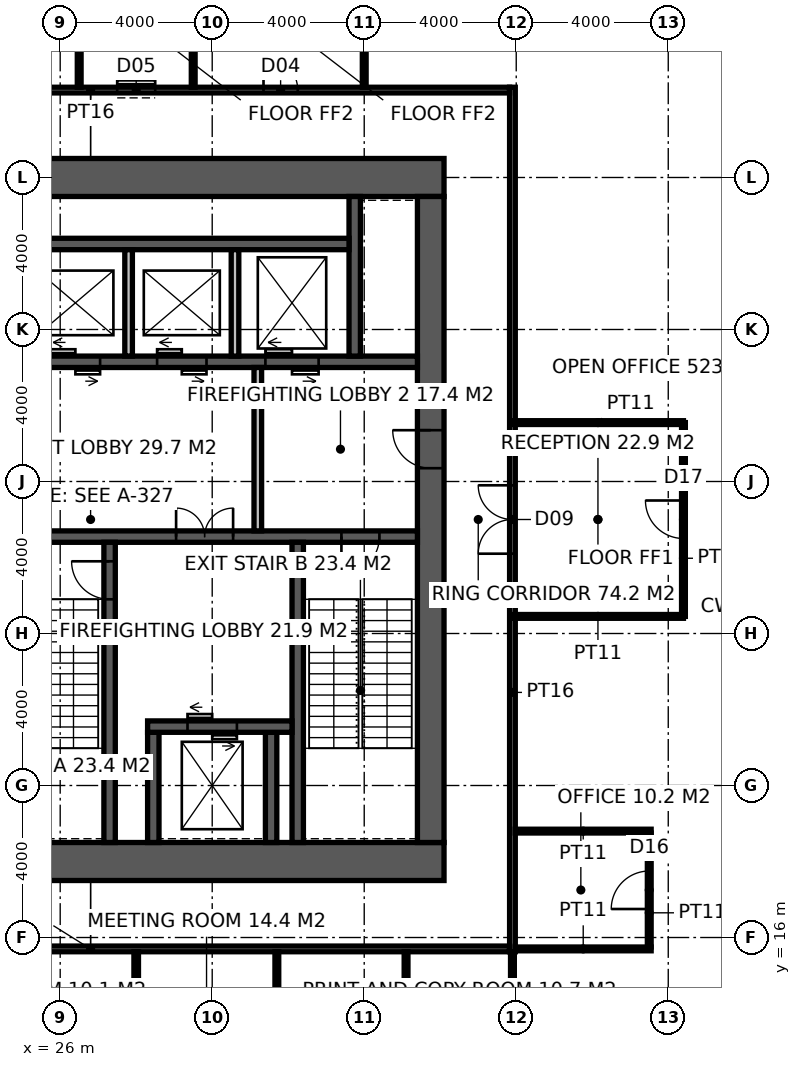
"""IFC4 building model, lengths in metres.
Left out: names, types, materials, properties, quantities, classifications, styles, units other than length and angle.
Written with IfcOpenShell. Run it as: python <this file> out.ifc"""

import sys

from ifc_helpers import new_model, si_unit, direction, frame, frame_2d, origin, place, context, subcontext, project, spatial, rectangle, extrude, element, fill, save


model = new_model("IFC4")
c1 = context("Model", 3, precision=1e-05, world=origin(), true_north=direction((0.0, 1.0)))
c2 = subcontext(c1, "Body", "Model", "MODEL_VIEW")
j1 = project(units=[si_unit("LENGTHUNIT", "METRE"), si_unit("PLANEANGLEUNIT", "RADIAN")], contexts=[c1])
p1 = place(None, origin())
s1 = spatial("IfcSite", under=j1, at=p1, CompositionType="ELEMENT")
p2 = place(p1, origin())
s2 = spatial("IfcBuilding", under=s1, at=p2, CompositionType="ELEMENT")
p3 = place(p2, frame((0.0, 0.0, 142.8)))
s3 = spatial("IfcBuildingStorey", under=s2, at=p3, CompositionType="ELEMENT", Elevation=142.8)
p4 = place(p3, frame((18.5, 18.0, -0.15), z_axis=(0.0, 0.0, 1.0), x_axis=(1.0, 0.0, 0.0)))
e1 = element("IfcWall", 1, at=p4, inside=s3, PredefinedType="SHEAR", context=c2, shape_type="SweptSolid", body=[
    extrude(rectangle(XDim=17.6, YDim=1.0, at=frame_2d((8.8, 0.0))), origin(), (0.0, 0.0, 1.0), 5.0),
])
p5 = place(p4, frame((3.45, 0.0, 0.15)))
e2 = element("IfcOpeningElement", 2, at=p5, cuts=e1, PredefinedType="OPENING", context=c2, shape_type="SweptSolid", body=[
    extrude(rectangle(XDim=1.5, YDim=2.4, at=frame_2d((0.75, 1.2))), frame((0.0, 0.51, 0.0), z_axis=(0.0, -1.0, 0.0), x_axis=(1.0, 0.0, 0.0)), (0.0, 0.0, 1.0), 1.02),
])
p6 = place(p3, frame((18.5, 36.0, -0.15), z_axis=(0.0, 0.0, 1.0), x_axis=(1.0, 0.0, 0.0)))
e3 = element("IfcWall", 3, at=p6, inside=s3, PredefinedType="SHEAR", context=c2, shape_type="SweptSolid", body=[
    extrude(rectangle(XDim=17.6, YDim=1.0, at=frame_2d((8.8, 0.0))), origin(), (0.0, 0.0, 1.0), 5.0),
])
p7 = place(p3, frame((35.75, 18.5, -0.15), z_axis=(0.0, 0.0, 1.0), x_axis=(0.0, 1.0, 0.0)))
e4 = element("IfcWall", 4, at=p7, inside=s3, PredefinedType="SHEAR", context=c2, shape_type="SweptSolid", body=[
    extrude(rectangle(XDim=17.0, YDim=0.7, at=frame_2d((8.5, 0.0))), origin(), (0.0, 0.0, 1.0), 5.0),
])
p8 = place(p7, frame((9.85, 0.0, 0.15)))
e5 = element("IfcOpeningElement", 5, at=p8, cuts=e4, PredefinedType="OPENING", context=c2, shape_type="SweptSolid", body=[
    extrude(rectangle(XDim=1.0, YDim=2.2, at=frame_2d((0.5, 1.1))), frame((0.0, 0.36, 0.0), z_axis=(0.0, -1.0, 0.0), x_axis=(1.0, 0.0, 0.0)), (0.0, 0.0, 1.0), 0.72),
])
p9 = place(p3, frame((24.15, 26.55, -0.15), z_axis=(0.0, 0.0, 1.0), x_axis=(1.0, 0.0, 0.0)))
e6 = element("IfcWall", 6, at=p9, inside=s3, PredefinedType="SHEAR", context=c2, shape_type="SweptSolid", body=[
    extrude(rectangle(XDim=11.25, YDim=0.3, at=frame_2d((5.625, 0.0))), origin(), (0.0, 0.0, 1.0), 5.0),
])
p10 = place(p9, frame((9.25, 0.0, 0.15)))
e7 = element("IfcOpeningElement", 7, at=p10, cuts=e6, PredefinedType="OPENING", context=c2, shape_type="SweptSolid", body=[
    extrude(rectangle(XDim=1.0, YDim=2.2, at=frame_2d((0.5, 1.1))), frame((0.0, 0.16, 0.0), z_axis=(0.0, -1.0, 0.0), x_axis=(1.0, 0.0, 0.0)), (0.0, 0.0, 1.0), 0.32),
])
p11 = place(p9, frame((4.9, 0.0, 0.15)))
e8 = element("IfcOpeningElement", 8, at=p11, cuts=e6, PredefinedType="OPENING", context=c2, shape_type="SweptSolid", body=[
    extrude(rectangle(XDim=1.5, YDim=2.4, at=frame_2d((0.75, 1.2))), frame((0.0, 0.16, 0.0), z_axis=(0.0, -1.0, 0.0), x_axis=(1.0, 0.0, 0.0)), (0.0, 0.0, 1.0), 0.32),
])
p12 = place(p3, frame((27.3, 18.5, -0.15), z_axis=(0.0, 0.0, 1.0), x_axis=(0.0, 1.0, 0.0)))
e9 = element("IfcWall", 9, at=p12, inside=s3, PredefinedType="SHEAR", context=c2, shape_type="SweptSolid", body=[
    extrude(rectangle(XDim=7.9, YDim=0.3, at=frame_2d((3.95, 0.0))), origin(), (0.0, 0.0, 1.0), 5.0),
])
p13 = place(p12, frame((6.4, 0.0, 0.15)))
e10 = element("IfcOpeningElement", 10, at=p13, cuts=e9, PredefinedType="OPENING", context=c2, shape_type="SweptSolid", body=[
    extrude(rectangle(XDim=1.0, YDim=2.2, at=frame_2d((0.5, 1.1))), frame((0.0, 0.16, 0.0), z_axis=(0.0, -1.0, 0.0), x_axis=(1.0, 0.0, 0.0)), (0.0, 0.0, 1.0), 0.32),
])
p14 = place(p3, frame((32.25, 18.5, -0.15), z_axis=(0.0, 0.0, 1.0), x_axis=(0.0, 1.0, 0.0)))
e11 = element("IfcWall", 11, at=p14, inside=s3, PredefinedType="SHEAR", context=c2, shape_type="SweptSolid", body=[
    extrude(rectangle(XDim=7.9, YDim=0.3, at=frame_2d((3.95, 0.0))), origin(), (0.0, 0.0, 1.0), 5.0),
])
for number, where, z_axis, x_axis in (
    (12, (28.45, 18.5, -0.15), (0.0, 0.0, 1.0), (0.0, 1.0, 0.0)),
    (13, (31.55, 18.5, -0.15), (0.0, 0.0, 1.0), (0.0, 1.0, 0.0)),
):
    element("IfcWall", number, at=place(p3, frame(where, z_axis=z_axis, x_axis=x_axis)), inside=s3, PredefinedType="SHEAR", context=c2, shape_type="SweptSolid", body=[
        extrude(rectangle(XDim=2.9, YDim=0.3, at=frame_2d((1.45, 0.0))), origin(), (0.0, 0.0, 1.0), 5.0),
    ])
p15 = place(p3, frame((28.3, 21.55, -0.15), z_axis=(0.0, 0.0, 1.0), x_axis=(1.0, 0.0, 0.0)))
e14 = element("IfcWall", 14, at=p15, inside=s3, PredefinedType="SHEAR", context=c2, shape_type="SweptSolid", body=[
    extrude(rectangle(XDim=3.8, YDim=0.3, at=frame_2d((1.9, 0.0))), origin(), (0.0, 0.0, 1.0), 5.0),
])
p16 = place(p15, frame((1.05, 0.0, 0.15)))
e15 = element("IfcOpeningElement", 15, at=p16, cuts=e14, PredefinedType="OPENING", context=c2, shape_type="SweptSolid", body=[
    extrude(rectangle(XDim=1.3, YDim=2.4, at=frame_2d((0.65, 1.2))), frame((0.0, 0.16, 0.0), z_axis=(0.0, -1.0, 0.0), x_axis=(1.0, 0.0, 0.0)), (0.0, 0.0, 1.0), 0.32),
])
p17 = place(p3, frame((24.15, 31.15, -0.15), z_axis=(0.0, 0.0, 1.0), x_axis=(1.0, 0.0, 0.0)))
e16 = element("IfcWall", 16, at=p17, inside=s3, PredefinedType="SHEAR", context=c2, shape_type="SweptSolid", body=[
    extrude(rectangle(XDim=11.25, YDim=0.3, at=frame_2d((5.625, 0.0))), origin(), (0.0, 0.0, 1.0), 5.0),
])
p18 = place(p17, frame((1.6, 0.0, 0.15)))
e17 = element("IfcOpeningElement", 17, at=p18, cuts=e16, PredefinedType="OPENING", context=c2, shape_type="SweptSolid", body=[
    extrude(rectangle(XDim=1.3, YDim=2.4, at=frame_2d((0.65, 1.2))), frame((0.0, 0.16, 0.0), z_axis=(0.0, -1.0, 0.0), x_axis=(1.0, 0.0, 0.0)), (0.0, 0.0, 1.0), 0.32),
])
p19 = place(p17, frame((4.4, 0.0, 0.15)))
e18 = element("IfcOpeningElement", 18, at=p19, cuts=e16, PredefinedType="OPENING", context=c2, shape_type="SweptSolid", body=[
    extrude(rectangle(XDim=1.3, YDim=2.4, at=frame_2d((0.65, 1.2))), frame((0.0, 0.16, 0.0), z_axis=(0.0, -1.0, 0.0), x_axis=(1.0, 0.0, 0.0)), (0.0, 0.0, 1.0), 0.32),
])
p20 = place(p17, frame((7.25, 0.0, 0.15)))
e19 = element("IfcOpeningElement", 19, at=p20, cuts=e16, PredefinedType="OPENING", context=c2, shape_type="SweptSolid", body=[
    extrude(rectangle(XDim=1.4, YDim=2.4, at=frame_2d((0.7, 1.2))), frame((0.0, 0.16, 0.0), z_axis=(0.0, -1.0, 0.0), x_axis=(1.0, 0.0, 0.0)), (0.0, 0.0, 1.0), 0.32),
])
p21 = place(p3, frame((33.75, 31.3, -0.15), z_axis=(0.0, 0.0, 1.0), x_axis=(0.0, 1.0, 0.0)))
e20 = element("IfcWall", 20, at=p21, inside=s3, PredefinedType="SHEAR", context=c2, shape_type="SweptSolid", body=[
    extrude(rectangle(XDim=4.2, YDim=0.3, at=frame_2d((2.1, 0.0))), origin(), (0.0, 0.0, 1.0), 5.0),
])
p22 = place(p3, frame((25.0, 34.25, -0.15), z_axis=(0.0, 0.0, 1.0), x_axis=(1.0, 0.0, 0.0)))
e21 = element("IfcWall", 21, at=p22, inside=s3, PredefinedType="SHEAR", context=c2, shape_type="SweptSolid", body=[
    extrude(rectangle(XDim=8.6, YDim=0.3, at=frame_2d((4.3, 0.0))), origin(), (0.0, 0.0, 1.0), 5.0),
])
for number, where, z_axis, x_axis in (
    (22, (27.8, 31.3, -0.15), (0.0, 0.0, 1.0), (0.0, 1.0, 0.0)),
    (23, (30.6, 31.3, -0.15), (0.0, 0.0, 1.0), (0.0, 1.0, 0.0)),
):
    element("IfcWall", number, at=place(p3, frame(where, z_axis=z_axis, x_axis=x_axis)), inside=s3, PredefinedType="SOLIDWALL", context=c2, shape_type="SweptSolid", body=[
        extrude(rectangle(XDim=2.8, YDim=0.2, at=frame_2d((1.4, 0.0))), origin(), (0.0, 0.0, 1.0), 5.0),
    ])
p23 = place(p3, frame((31.2, 26.7, 0.0), z_axis=(0.0, 0.0, 1.0), x_axis=(0.0, 1.0, 0.0)))
e24 = element("IfcWall", 24, at=p23, inside=s3, PredefinedType="SOLIDWALL", context=c2, shape_type="SweptSolid", body=[
    extrude(rectangle(XDim=4.3, YDim=0.2, at=frame_2d((2.15, 0.0))), origin(), (0.0, 0.0, 1.0), 4.85),
])
p24 = place(p3, frame((37.9, 15.625, 0.0), z_axis=(0.0, 0.0, 1.0), x_axis=(0.0, 1.0, 0.0)))
e25 = element("IfcWall", 25, at=p24, inside=s3, PredefinedType="PARTITIONING", context=c2, shape_type="SweptSolid", body=[
    extrude(rectangle(XDim=22.75, YDim=0.15, at=frame_2d((11.375, 0.0))), origin(), (0.0, 0.0, 1.0), 3.95),
])
p25 = place(p24, frame((10.475, 0.0, 0.0)))
e26 = element("IfcOpeningElement", 26, at=p25, cuts=e25, PredefinedType="OPENING", context=c2, shape_type="SweptSolid", body=[
    extrude(rectangle(XDim=1.8, YDim=2.4, at=frame_2d((0.9, 1.2))), frame((0.0, 0.085, 0.0), z_axis=(0.0, -1.0, 0.0), x_axis=(1.0, 0.0, 0.0)), (0.0, 0.0, 1.0), 0.17),
])
p26 = place(p3, frame((15.775, 15.7, 0.0), z_axis=(0.0, 0.0, 1.0), x_axis=(1.0, 0.0, 0.0)))
e27 = element("IfcWall", 27, at=p26, inside=s3, PredefinedType="PARTITIONING", context=c2, shape_type="SweptSolid", body=[
    extrude(rectangle(XDim=22.05, YDim=0.15, at=frame_2d((11.025, 0.0))), origin(), (0.0, 0.0, 1.0), 4.85),
])
p27 = place(p3, frame((15.775, 38.3, 0.0), z_axis=(0.0, 0.0, 1.0), x_axis=(1.0, 0.0, 0.0)))
e28 = element("IfcWall", 28, at=p27, inside=s3, PredefinedType="PARTITIONING", context=c2, shape_type="SweptSolid", body=[
    extrude(rectangle(XDim=22.05, YDim=0.15, at=frame_2d((11.025, 0.0))), origin(), (0.0, 0.0, 1.0), 4.85),
])
p28 = place(p27, frame((7.975, 0.0, 0.0)))
e29 = element("IfcOpeningElement", 29, at=p28, cuts=e28, PredefinedType="OPENING", context=c2, shape_type="SweptSolid", body=[
    extrude(rectangle(XDim=0.9, YDim=2.1, at=frame_2d((0.45, 1.05))), frame((0.0, 0.085, 0.0), z_axis=(0.0, -1.0, 0.0), x_axis=(1.0, 0.0, 0.0)), (0.0, 0.0, 1.0), 0.17),
])
p29 = place(p27, frame((11.725, 0.0, 0.0)))
e30 = element("IfcOpeningElement", 30, at=p29, cuts=e28, PredefinedType="OPENING", context=c2, shape_type="SweptSolid", body=[
    extrude(rectangle(XDim=1.0, YDim=2.1, at=frame_2d((0.5, 1.05))), frame((0.0, 0.085, 0.0), z_axis=(0.0, -1.0, 0.0), x_axis=(1.0, 0.0, 0.0)), (0.0, 0.0, 1.0), 0.17),
])
p30 = place(p27, frame((15.575, 0.0, 0.0)))
e31 = element("IfcOpeningElement", 31, at=p30, cuts=e28, PredefinedType="OPENING", context=c2, shape_type="SweptSolid", body=[
    extrude(rectangle(XDim=0.9, YDim=2.1, at=frame_2d((0.45, 1.05))), frame((0.0, 0.085, 0.0), z_axis=(0.0, -1.0, 0.0), x_axis=(1.0, 0.0, 0.0)), (0.0, 0.0, 1.0), 0.17),
])
p31 = place(p3, frame((34.0, 38.375, 0.0), z_axis=(0.0, 0.0, 1.0), x_axis=(0.0, 1.0, 0.0)))
e32 = element("IfcWall", 32, at=p31, inside=s3, PredefinedType="PARTITIONING", context=c2, shape_type="SweptSolid", body=[
    extrude(rectangle(XDim=3.675, YDim=0.1, at=frame_2d((1.837, 0.0))), origin(), (0.0, 0.0, 1.0), 3.95),
])
for number, where, z_axis, x_axis in (
    (33, (26.5, 38.375, 0.0), (0.0, 0.0, 1.0), (0.0, 1.0, 0.0)),
    (34, (29.5, 38.375, 0.0), (0.0, 0.0, 1.0), (0.0, 1.0, 0.0)),
):
    element("IfcWall", number, at=place(p3, frame(where, z_axis=z_axis, x_axis=x_axis)), inside=s3, PredefinedType="PARTITIONING", context=c2, shape_type="SweptSolid", body=[
        extrude(rectangle(XDim=3.575, YDim=0.1, at=frame_2d((1.788, 0.0))), origin(), (0.0, 0.0, 1.0), 4.85),
    ])
p32 = place(p3, frame((28.0, 4.3, 0.0), z_axis=(0.0, 0.0, 1.0), x_axis=(0.0, 1.0, 0.0)))
e35 = element("IfcWall", 35, at=p32, inside=s3, PredefinedType="PARTITIONING", context=c2, shape_type="SweptSolid", body=[
    extrude(rectangle(XDim=11.325, YDim=0.12, at=frame_2d((5.663, 0.0))), origin(), (0.0, 0.0, 1.0), 4.85),
])
for number, where, z_axis, x_axis in (
    (36, (37.975, 15.7, 0.0), (0.0, 0.0, 1.0), (1.0, 0.0, 0.0)),
    (37, (37.975, 18.8, 0.0), (0.0, 0.0, 1.0), (1.0, 0.0, 0.0)),
):
    element("IfcWall", number, at=place(p3, frame(where, z_axis=z_axis, x_axis=x_axis)), inside=s3, PredefinedType="PARTITIONING", context=c2, shape_type="SweptSolid", body=[
        extrude(rectangle(XDim=3.575, YDim=0.1, at=frame_2d((1.788, 0.0))), origin(), (0.0, 0.0, 1.0), 4.85),
    ])
for number, where, z_axis, x_axis in (
    (38, (31.701, 11.55, 0.0), (0.0, 0.0, 1.0), (0.0, 1.0, 0.0)),
    (39, (35.101, 11.55, 0.0), (0.0, 0.0, 1.0), (0.0, 1.0, 0.0)),
):
    element("IfcWall", number, at=place(p3, frame(where, z_axis=z_axis, x_axis=x_axis)), inside=s3, PredefinedType="PARTITIONING", context=c2, shape_type="SweptSolid", body=[
        extrude(rectangle(XDim=4.075, YDim=0.1, at=frame_2d((2.038, 0.0))), origin(), (0.0, 0.0, 1.0), 4.85),
    ])
p33 = place(p3, frame((37.9, 11.55, 0.0), z_axis=(0.0, 0.0, 1.0), x_axis=(0.0, 1.0, 0.0)))
e40 = element("IfcWall", 40, at=p33, inside=s3, PredefinedType="PARTITIONING", context=c2, shape_type="SweptSolid", body=[
    extrude(rectangle(XDim=4.075, YDim=0.1, at=frame_2d((2.038, 0.0))), origin(), (0.0, 0.0, 1.0), 3.95),
])
p34 = place(p3, frame((41.5, 15.75, 0.0), z_axis=(0.0, 0.0, 1.0), x_axis=(0.0, 1.0, 0.0)))
e41 = element("IfcWall", 41, at=p34, inside=s3, PredefinedType="PARTITIONING", context=c2, shape_type="SweptSolid", body=[
    extrude(rectangle(XDim=3.0, YDim=0.1, at=frame_2d((1.5, 0.0))), origin(), (0.0, 0.0, 1.0), 4.85),
])
p35 = place(p34, frame((1.0, 0.0, 0.0)))
e42 = element("IfcOpeningElement", 42, at=p35, cuts=e41, PredefinedType="OPENING", context=c2, shape_type="SweptSolid", body=[
    extrude(rectangle(XDim=1.0, YDim=2.2, at=frame_2d((0.5, 1.1))), frame((0.0, 0.06, 0.0), z_axis=(0.0, -1.0, 0.0), x_axis=(1.0, 0.0, 0.0)), (0.0, 0.0, 1.0), 0.12),
])
p36 = place(p3, frame((37.9, 24.45, 0.0), z_axis=(0.0, 0.0, 1.0), x_axis=(1.0, 0.0, 0.0)))
e43 = element("IfcWall", 43, at=p36, inside=s3, PredefinedType="PARTITIONING", context=c2, shape_type="SweptSolid", body=[
    extrude(rectangle(XDim=4.5, YDim=0.1, at=frame_2d((2.25, 0.0))), origin(), (0.0, 0.0, 1.0), 4.85),
])
p37 = place(p3, frame((42.4, 24.45, 0.0), z_axis=(0.0, 0.0, 1.0), x_axis=(0.0, 1.0, 0.0)))
e44 = element("IfcWall", 44, at=p37, inside=s3, PredefinedType="PARTITIONING", context=c2, shape_type="SweptSolid", body=[
    extrude(rectangle(XDim=5.1, YDim=0.1, at=frame_2d((2.55, 0.0))), origin(), (0.0, 0.0, 1.0), 4.85),
])
p38 = place(p37, frame((2.05, 0.0, 0.0)))
e45 = element("IfcOpeningElement", 45, at=p38, cuts=e44, PredefinedType="OPENING", context=c2, shape_type="SweptSolid", body=[
    extrude(rectangle(XDim=1.0, YDim=2.2, at=frame_2d((0.5, 1.1))), frame((0.0, 0.06, 0.0), z_axis=(0.0, -1.0, 0.0), x_axis=(1.0, 0.0, 0.0)), (0.0, 0.0, 1.0), 0.12),
])
p39 = place(p3, frame((42.4, 29.55, 0.0), z_axis=(0.0, 0.0, 1.0), x_axis=(-1.0, 0.0, 0.0)))
e46 = element("IfcWall", 46, at=p39, inside=s3, PredefinedType="PARTITIONING", context=c2, shape_type="SweptSolid", body=[
    extrude(rectangle(XDim=4.5, YDim=0.1, at=frame_2d((2.25, 0.0))), origin(), (0.0, 0.0, 1.0), 4.85),
])
p40 = place(p13, origin())
e47 = element("IfcDoor", 47, at=p40, inside=s3, OperationType="SINGLE_SWING_RIGHT", PredefinedType="DOOR", context=c2, shape_type="SweptSolid", body=[
    extrude(rectangle(XDim=1.0, YDim=2.2, at=frame_2d((0.5, 1.1))), frame((0.0, 0.025, 0.0), z_axis=(0.0, -1.0, 0.0), x_axis=(1.0, 0.0, 0.0)), (0.0, 0.0, 1.0), 0.05),
])
fill(e10, e47)
p41 = place(p10, frame((1.0, 0.0, 0.0), z_axis=(0.0, 0.0, 1.0), x_axis=(-1.0, 0.0, 0.0)))
e48 = element("IfcDoor", 48, at=p41, inside=s3, OperationType="SINGLE_SWING_RIGHT", PredefinedType="DOOR", context=c2, shape_type="SweptSolid", body=[
    extrude(rectangle(XDim=1.0, YDim=2.2, at=frame_2d((0.5, 1.1))), frame((0.0, 0.025, 0.0), z_axis=(0.0, -1.0, 0.0), x_axis=(1.0, 0.0, 0.0)), (0.0, 0.0, 1.0), 0.05),
])
fill(e7, e48)
p42 = place(p8, origin())
e49 = element("IfcDoor", 49, at=p42, inside=s3, OperationType="SINGLE_SWING_RIGHT", PredefinedType="DOOR", context=c2, shape_type="SweptSolid", body=[
    extrude(rectangle(XDim=1.0, YDim=2.2, at=frame_2d((0.5, 1.1))), frame((0.0, 0.025, 0.0), z_axis=(0.0, -1.0, 0.0), x_axis=(1.0, 0.0, 0.0)), (0.0, 0.0, 1.0), 0.05),
])
fill(e5, e49)
p43 = place(p11, origin())
e50 = element("IfcDoor", 50, at=p43, inside=s3, OperationType="DOUBLE_DOOR_DOUBLE_SWING", PredefinedType="DOOR", context=c2, shape_type="SweptSolid", body=[
    extrude(rectangle(XDim=1.5, YDim=2.4, at=frame_2d((0.75, 1.2))), frame((0.0, 0.025, 0.0), z_axis=(0.0, -1.0, 0.0), x_axis=(1.0, 0.0, 0.0)), (0.0, 0.0, 1.0), 0.05),
])
fill(e8, e50)
p44 = place(p29, origin())
e51 = element("IfcDoor", 51, at=p44, inside=s3, OperationType="SLIDING_TO_LEFT", PredefinedType="DOOR", context=c2, shape_type="SweptSolid", body=[
    extrude(rectangle(XDim=1.0, YDim=2.1, at=frame_2d((0.5, 1.05))), frame((0.0, 0.025, 0.0), z_axis=(0.0, -1.0, 0.0), x_axis=(1.0, 0.0, 0.0)), (0.0, 0.0, 1.0), 0.05),
])
fill(e30, e51)
p45 = place(p30, origin())
e52 = element("IfcDoor", 52, at=p45, inside=s3, OperationType="SINGLE_SWING_LEFT", PredefinedType="DOOR", context=c2, shape_type="SweptSolid", body=[
    extrude(rectangle(XDim=0.9, YDim=2.1, at=frame_2d((0.45, 1.05))), frame((0.0, 0.025, 0.0), z_axis=(0.0, -1.0, 0.0), x_axis=(1.0, 0.0, 0.0)), (0.0, 0.0, 1.0), 0.05),
])
fill(e31, e52)
p46 = place(p25, origin())
e53 = element("IfcDoor", 53, at=p46, inside=s3, OperationType="DOUBLE_DOOR_DOUBLE_SWING", PredefinedType="DOOR", context=c2, shape_type="SweptSolid", body=[
    extrude(rectangle(XDim=1.8, YDim=2.4, at=frame_2d((0.9, 1.2))), frame((0.0, 0.025, 0.0), z_axis=(0.0, -1.0, 0.0), x_axis=(1.0, 0.0, 0.0)), (0.0, 0.0, 1.0), 0.05),
])
fill(e26, e53)
p47 = place(p35, origin())
e54 = element("IfcDoor", 54, at=p47, inside=s3, OperationType="SINGLE_SWING_LEFT", PredefinedType="DOOR", context=c2, shape_type="SweptSolid", body=[
    extrude(rectangle(XDim=1.0, YDim=2.2, at=frame_2d((0.5, 1.1))), frame((0.0, 0.025, 0.0), z_axis=(0.0, -1.0, 0.0), x_axis=(1.0, 0.0, 0.0)), (0.0, 0.0, 1.0), 0.05),
])
fill(e42, e54)
p48 = place(p38, origin())
e55 = element("IfcDoor", 55, at=p48, inside=s3, OperationType="SINGLE_SWING_RIGHT", PredefinedType="DOOR", context=c2, shape_type="SweptSolid", body=[
    extrude(rectangle(XDim=1.0, YDim=2.2, at=frame_2d((0.5, 1.1))), frame((0.0, 0.025, 0.0), z_axis=(0.0, -1.0, 0.0), x_axis=(1.0, 0.0, 0.0)), (0.0, 0.0, 1.0), 0.05),
])
fill(e45, e55)
p49 = place(p16, origin())
e56 = element("IfcDoor", 56, at=p49, inside=s3, OperationType="DOUBLE_DOOR_SLIDING", PredefinedType="DOOR", context=c2, shape_type="SweptSolid", body=[
    extrude(rectangle(XDim=1.3, YDim=2.4, at=frame_2d((0.65, 1.2))), frame((0.0, 0.025, 0.0), z_axis=(0.0, -1.0, 0.0), x_axis=(1.0, 0.0, 0.0)), (0.0, 0.0, 1.0), 0.05),
])
fill(e15, e56)
p50 = place(p18, origin())
e57 = element("IfcDoor", 57, at=p50, inside=s3, OperationType="DOUBLE_DOOR_SLIDING", PredefinedType="DOOR", context=c2, shape_type="SweptSolid", body=[
    extrude(rectangle(XDim=1.3, YDim=2.4, at=frame_2d((0.65, 1.2))), frame((0.0, 0.025, 0.0), z_axis=(0.0, -1.0, 0.0), x_axis=(1.0, 0.0, 0.0)), (0.0, 0.0, 1.0), 0.05),
])
fill(e17, e57)
p51 = place(p19, origin())
e58 = element("IfcDoor", 58, at=p51, inside=s3, OperationType="DOUBLE_DOOR_SLIDING", PredefinedType="DOOR", context=c2, shape_type="SweptSolid", body=[
    extrude(rectangle(XDim=1.3, YDim=2.4, at=frame_2d((0.65, 1.2))), frame((0.0, 0.025, 0.0), z_axis=(0.0, -1.0, 0.0), x_axis=(1.0, 0.0, 0.0)), (0.0, 0.0, 1.0), 0.05),
])
fill(e18, e58)
p52 = place(p20, origin())
e59 = element("IfcDoor", 59, at=p52, inside=s3, OperationType="DOUBLE_DOOR_SLIDING", PredefinedType="DOOR", context=c2, shape_type="SweptSolid", body=[
    extrude(rectangle(XDim=1.4, YDim=2.4, at=frame_2d((0.7, 1.2))), frame((0.0, 0.025, 0.0), z_axis=(0.0, -1.0, 0.0), x_axis=(1.0, 0.0, 0.0)), (0.0, 0.0, 1.0), 0.05),
])
fill(e19, e59)
save(model, sys.argv[1])
